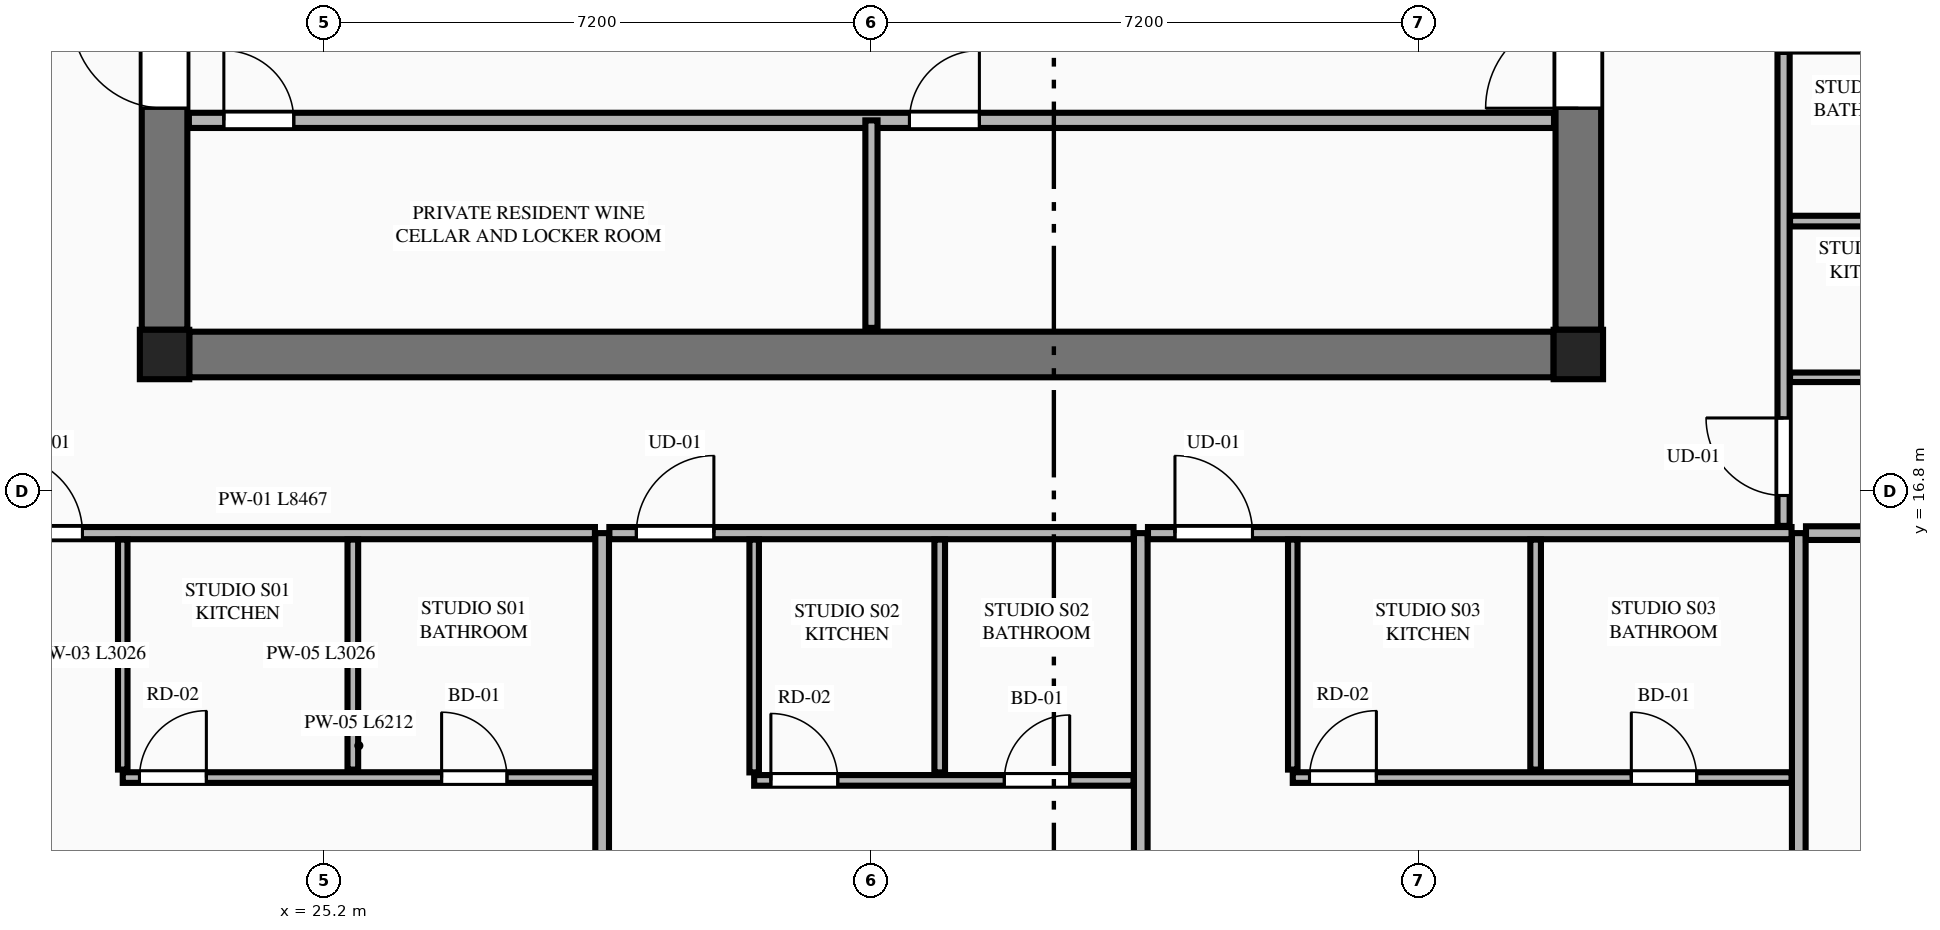
"""IFC4 building model, lengths in metres.
Left out: names, types, materials, properties, quantities, classifications, styles, units other than length and angle.
Written with IfcOpenShell. Run it as: python <this file> out.ifc"""

import sys

from ifc_helpers import new_model, si_unit, direction, frame, frame_2d, origin, origin_2d, place, context, subcontext, project, spatial, rectangle, extrude, element, fill, save


model = new_model("IFC4")
c1 = context("Model", 3, precision=1e-05, world=origin(), true_north=direction((0.0, 1.0)))
c2 = subcontext(c1, "Body", "Model", "MODEL_VIEW")
j1 = project(units=[si_unit("LENGTHUNIT", "METRE"), si_unit("PLANEANGLEUNIT", "RADIAN")], contexts=[c1])
p1 = place(None, origin())
s1 = spatial("IfcSite", under=j1, at=p1, CompositionType="ELEMENT")
p2 = place(p1, origin())
s2 = spatial("IfcBuilding", under=s1, at=p2, CompositionType="ELEMENT")
p3 = place(p2, frame((0.0, 0.0, 203.85)))
s3 = spatial("IfcBuildingStorey", under=s2, at=p3, CompositionType="ELEMENT", Elevation=203.85)
for number, where, z_axis, x_axis in (
    (1, (23.1, 18.6, 0.0), (0.0, 0.0, 1.0), (1.0, 0.0, 0.0)),
    (2, (41.7, 18.6, 0.0), (0.0, 0.0, 1.0), (1.0, 0.0, 0.0)),
):
    element("IfcColumn", number, at=place(p3, frame(where, z_axis=z_axis, x_axis=x_axis)), inside=s3, PredefinedType="COLUMN", context=c2, shape_type="SweptSolid", body=[
        extrude(rectangle(XDim=0.65, YDim=0.65, at=origin_2d()), origin(), (0.0, 0.0, 1.0), 3.55),
    ])
p4 = place(p3, frame((23.425, 18.6, 0.0), z_axis=(0.0, 0.0, 1.0), x_axis=(1.0, 0.0, 0.0)))
e3 = element("IfcWall", 3, at=p4, inside=s3, PredefinedType="SHEAR", context=c2, shape_type="SweptSolid", body=[
    extrude(rectangle(XDim=17.95, YDim=0.6, at=frame_2d((8.975, 0.0))), origin(), (0.0, 0.0, 1.0), 3.35),
])
p5 = place(p3, frame((23.1, 18.925, 0.0), z_axis=(0.0, 0.0, 1.0), x_axis=(0.0, 1.0, 0.0)))
e4 = element("IfcWall", 4, at=p5, inside=s3, PredefinedType="SHEAR", context=c2, shape_type="SweptSolid", body=[
    extrude(rectangle(XDim=13.95, YDim=0.6, at=frame_2d((6.975, 0.0))), origin(), (0.0, 0.0, 1.0), 3.35),
])
p6 = place(p5, frame((2.915, 0.0, 0.0)))
e5 = element("IfcOpeningElement", 5, at=p6, cuts=e4, PredefinedType="OPENING", context=c2, shape_type="SweptSolid", body=[
    extrude(rectangle(XDim=1.22, YDim=2.25, at=frame_2d((0.61, 1.125))), frame((0.0, 0.31, 0.0), z_axis=(0.0, -1.0, 0.0), x_axis=(1.0, 0.0, 0.0)), (0.0, 0.0, 1.0), 0.62),
])
p7 = place(p3, frame((41.7, 18.925, 0.0), z_axis=(0.0, 0.0, 1.0), x_axis=(0.0, 1.0, 0.0)))
e6 = element("IfcWall", 6, at=p7, inside=s3, PredefinedType="SHEAR", context=c2, shape_type="SweptSolid", body=[
    extrude(rectangle(XDim=13.95, YDim=0.6, at=frame_2d((6.975, 0.0))), origin(), (0.0, 0.0, 1.0), 3.35),
])
p8 = place(p7, frame((2.915, 0.0, 0.0)))
e7 = element("IfcOpeningElement", 7, at=p8, cuts=e6, PredefinedType="OPENING", context=c2, shape_type="SweptSolid", body=[
    extrude(rectangle(XDim=1.22, YDim=2.25, at=frame_2d((0.61, 1.125))), frame((0.0, 0.31, 0.0), z_axis=(0.0, -1.0, 0.0), x_axis=(1.0, 0.0, 0.0)), (0.0, 0.0, 1.0), 0.62),
])
p9 = place(p3, frame((23.42, 21.68, 0.0), z_axis=(0.0, 0.0, 1.0), x_axis=(1.0, 0.0, 0.0)))
e8 = element("IfcWall", 8, at=p9, inside=s3, PredefinedType="PLUMBINGWALL", context=c2, shape_type="SweptSolid", body=[
    extrude(rectangle(XDim=17.96, YDim=0.2, at=frame_2d((8.98, 0.0))), origin(), (0.0, 0.0, 1.0), 3.35),
])
p10 = place(p9, frame((0.46, 0.0, 0.0)))
e9 = element("IfcOpeningElement", 9, at=p10, cuts=e8, PredefinedType="OPENING", context=c2, shape_type="SweptSolid", body=[
    extrude(rectangle(XDim=0.92, YDim=2.15, at=frame_2d((0.46, 1.075))), frame((0.0, 0.11, 0.0), z_axis=(0.0, -1.0, 0.0), x_axis=(1.0, 0.0, 0.0)), (0.0, 0.0, 1.0), 0.22),
])
p11 = place(p9, frame((9.48, 0.0, 0.0)))
e10 = element("IfcOpeningElement", 10, at=p11, cuts=e8, PredefinedType="OPENING", context=c2, shape_type="SweptSolid", body=[
    extrude(rectangle(XDim=0.92, YDim=2.15, at=frame_2d((0.46, 1.075))), frame((0.0, 0.11, 0.0), z_axis=(0.0, -1.0, 0.0), x_axis=(1.0, 0.0, 0.0)), (0.0, 0.0, 1.0), 0.22),
])
p12 = place(p3, frame((32.4, 18.95, 0.0), z_axis=(0.0, 0.0, 1.0), x_axis=(0.0, 1.0, 0.0)))
e11 = element("IfcWall", 11, at=p12, inside=s3, PredefinedType="PARTITIONING", context=c2, shape_type="SweptSolid", body=[
    extrude(rectangle(XDim=2.73, YDim=0.16, at=frame_2d((1.365, 0.0))), origin(), (0.0, 0.0, 1.0), 3.35),
])
for number, where, z_axis, x_axis in (
    (12, (28.857, 5.755, 0.0), (0.0, 0.0, 1.0), (0.0, 1.0, 0.0)),
    (13, (35.943, 5.755, 0.0), (0.0, 0.0, 1.0), (0.0, 1.0, 0.0)),
):
    element("IfcWall", number, at=place(p3, frame(where, z_axis=z_axis, x_axis=x_axis)), inside=s3, PredefinedType="PARTITIONING", context=c2, shape_type="SweptSolid", body=[
        extrude(rectangle(XDim=10.495, YDim=0.18, at=frame_2d((5.248, 0.0))), origin(), (0.0, 0.0, 1.0), 2.807),
    ])
p13 = place(p3, frame((44.6, 5.968, 0.0), z_axis=(0.0, 0.0, 1.0), x_axis=(0.0, 1.0, 0.0)))
e14 = element("IfcWall", 14, at=p13, inside=s3, PredefinedType="PARTITIONING", context=c2, shape_type="SweptSolid", body=[
    extrude(rectangle(XDim=10.282, YDim=0.18, at=frame_2d((5.141, 0.0))), origin(), (0.0, 0.0, 1.0), 3.35),
])
p14 = place(p3, frame((20.295, 16.25, 0.0), z_axis=(0.0, 0.0, 1.0), x_axis=(1.0, 0.0, 0.0)))
e15 = element("IfcWall", 15, at=p14, inside=s3, PredefinedType="PARTITIONING", context=c2, shape_type="SweptSolid", body=[
    extrude(rectangle(XDim=8.467, YDim=0.16, at=frame_2d((4.233, 0.0))), origin(), (0.0, 0.0, 1.0), 3.35),
])
p15 = place(p14, frame((0.705, 0.0, 0.0)))
e16 = element("IfcOpeningElement", 16, at=p15, cuts=e15, PredefinedType="OPENING", context=c2, shape_type="SweptSolid", body=[
    extrude(rectangle(XDim=1.02, YDim=2.25, at=frame_2d((0.51, 1.125))), frame((0.0, 0.09, 0.0), z_axis=(0.0, -1.0, 0.0), x_axis=(1.0, 0.0, 0.0)), (0.0, 0.0, 1.0), 0.18),
])
p16 = place(p3, frame((22.55, 13.139, 0.0), z_axis=(0.0, 0.0, 1.0), x_axis=(0.0, 1.0, 0.0)))
e17 = element("IfcWall", 17, at=p16, inside=s3, PredefinedType="PARTITIONING", context=c2, shape_type="SweptSolid", body=[
    extrude(rectangle(XDim=3.026, YDim=0.125, at=frame_2d((1.513, 0.0))), origin(), (0.0, 0.0, 1.0), 2.807),
])
p17 = place(p3, frame((22.55, 13.034, 0.0), z_axis=(0.0, 0.0, 1.0), x_axis=(1.0, 0.0, 0.0)))
e18 = element("IfcWall", 18, at=p17, inside=s3, PredefinedType="PLUMBINGWALL", context=c2, shape_type="SweptSolid", body=[
    extrude(rectangle(XDim=6.212, YDim=0.14, at=frame_2d((3.106, 0.0))), origin(), (0.0, 0.0, 1.0), 3.35),
])
p18 = place(p17, frame((4.195, 0.0, 0.0)))
e19 = element("IfcOpeningElement", 19, at=p18, cuts=e18, PredefinedType="OPENING", context=c2, shape_type="SweptSolid", body=[
    extrude(rectangle(XDim=0.86, YDim=2.1, at=frame_2d((0.43, 1.05))), frame((0.0, 0.08, 0.0), z_axis=(0.0, -1.0, 0.0), x_axis=(1.0, 0.0, 0.0)), (0.0, 0.0, 1.0), 0.16),
])
p19 = place(p17, frame((0.22, 0.0, 0.0)))
e20 = element("IfcOpeningElement", 20, at=p19, cuts=e18, PredefinedType="OPENING", context=c2, shape_type="SweptSolid", body=[
    extrude(rectangle(XDim=0.88, YDim=2.15, at=frame_2d((0.44, 1.075))), frame((0.0, 0.08, 0.0), z_axis=(0.0, -1.0, 0.0), x_axis=(1.0, 0.0, 0.0)), (0.0, 0.0, 1.0), 0.16),
])
p20 = place(p3, frame((25.577, 13.139, 0.0), z_axis=(0.0, 0.0, 1.0), x_axis=(0.0, 1.0, 0.0)))
e21 = element("IfcWall", 21, at=p20, inside=s3, PredefinedType="PLUMBINGWALL", context=c2, shape_type="SweptSolid", body=[
    extrude(rectangle(XDim=3.026, YDim=0.14, at=frame_2d((1.513, 0.0))), origin(), (0.0, 0.0, 1.0), 3.35),
])
p21 = place(p3, frame((28.952, 16.25, 0.0), z_axis=(0.0, 0.0, 1.0), x_axis=(1.0, 0.0, 0.0)))
e22 = element("IfcWall", 22, at=p21, inside=s3, PredefinedType="PARTITIONING", context=c2, shape_type="SweptSolid", body=[
    extrude(rectangle(XDim=6.896, YDim=0.16, at=frame_2d((3.448, 0.0))), origin(), (0.0, 0.0, 1.0), 3.35),
])
p22 = place(p21, frame((0.355, 0.0, 0.0)))
e23 = element("IfcOpeningElement", 23, at=p22, cuts=e22, PredefinedType="OPENING", context=c2, shape_type="SweptSolid", body=[
    extrude(rectangle(XDim=1.02, YDim=2.25, at=frame_2d((0.51, 1.125))), frame((0.0, 0.09, 0.0), z_axis=(0.0, -1.0, 0.0), x_axis=(1.0, 0.0, 0.0)), (0.0, 0.0, 1.0), 0.18),
])
p23 = place(p3, frame((30.857, 13.102, 0.0), z_axis=(0.0, 0.0, 1.0), x_axis=(0.0, 1.0, 0.0)))
e24 = element("IfcWall", 24, at=p23, inside=s3, PredefinedType="PARTITIONING", context=c2, shape_type="SweptSolid", body=[
    extrude(rectangle(XDim=3.063, YDim=0.125, at=frame_2d((1.531, 0.0))), origin(), (0.0, 0.0, 1.0), 3.35),
])
p24 = place(p3, frame((30.857, 12.997, 0.0), z_axis=(0.0, 0.0, 1.0), x_axis=(1.0, 0.0, 0.0)))
e25 = element("IfcWall", 25, at=p24, inside=s3, PredefinedType="PLUMBINGWALL", context=c2, shape_type="SweptSolid", body=[
    extrude(rectangle(XDim=4.991, YDim=0.14, at=frame_2d((2.496, 0.0))), origin(), (0.0, 0.0, 1.0), 3.35),
])
p25 = place(p24, frame((3.291, 0.0, 0.0)))
e26 = element("IfcOpeningElement", 26, at=p25, cuts=e25, PredefinedType="OPENING", context=c2, shape_type="SweptSolid", body=[
    extrude(rectangle(XDim=0.86, YDim=2.1, at=frame_2d((0.43, 1.05))), frame((0.0, 0.08, 0.0), z_axis=(0.0, -1.0, 0.0), x_axis=(1.0, 0.0, 0.0)), (0.0, 0.0, 1.0), 0.16),
])
p26 = place(p24, frame((0.22, 0.0, 0.0)))
e27 = element("IfcOpeningElement", 27, at=p26, cuts=e25, PredefinedType="OPENING", context=c2, shape_type="SweptSolid", body=[
    extrude(rectangle(XDim=0.88, YDim=2.15, at=frame_2d((0.44, 1.075))), frame((0.0, 0.08, 0.0), z_axis=(0.0, -1.0, 0.0), x_axis=(1.0, 0.0, 0.0)), (0.0, 0.0, 1.0), 0.16),
])
p27 = place(p3, frame((33.298, 13.102, 0.0), z_axis=(0.0, 0.0, 1.0), x_axis=(0.0, 1.0, 0.0)))
e28 = element("IfcWall", 28, at=p27, inside=s3, PredefinedType="PLUMBINGWALL", context=c2, shape_type="SweptSolid", body=[
    extrude(rectangle(XDim=3.063, YDim=0.14, at=frame_2d((1.531, 0.0))), origin(), (0.0, 0.0, 1.0), 3.35),
])
p28 = place(p3, frame((36.038, 16.25, 0.0), z_axis=(0.0, 0.0, 1.0), x_axis=(1.0, 0.0, 0.0)))
e29 = element("IfcWall", 29, at=p28, inside=s3, PredefinedType="PARTITIONING", context=c2, shape_type="SweptSolid", body=[
    extrude(rectangle(XDim=8.467, YDim=0.16, at=frame_2d((4.233, 0.0))), origin(), (0.0, 0.0, 1.0), 3.35),
])
p29 = place(p28, frame((0.355, 0.0, 0.0)))
e30 = element("IfcOpeningElement", 30, at=p29, cuts=e29, PredefinedType="OPENING", context=c2, shape_type="SweptSolid", body=[
    extrude(rectangle(XDim=1.02, YDim=2.25, at=frame_2d((0.51, 1.125))), frame((0.0, 0.09, 0.0), z_axis=(0.0, -1.0, 0.0), x_axis=(1.0, 0.0, 0.0)), (0.0, 0.0, 1.0), 0.18),
])
p30 = place(p3, frame((37.943, 13.139, 0.0), z_axis=(0.0, 0.0, 1.0), x_axis=(0.0, 1.0, 0.0)))
e31 = element("IfcWall", 31, at=p30, inside=s3, PredefinedType="PARTITIONING", context=c2, shape_type="SweptSolid", body=[
    extrude(rectangle(XDim=3.026, YDim=0.125, at=frame_2d((1.513, 0.0))), origin(), (0.0, 0.0, 1.0), 3.35),
])
p31 = place(p3, frame((37.943, 13.034, 0.0), z_axis=(0.0, 0.0, 1.0), x_axis=(1.0, 0.0, 0.0)))
e32 = element("IfcWall", 32, at=p31, inside=s3, PredefinedType="PLUMBINGWALL", context=c2, shape_type="SweptSolid", body=[
    extrude(rectangle(XDim=6.562, YDim=0.14, at=frame_2d((3.281, 0.0))), origin(), (0.0, 0.0, 1.0), 3.35),
])
p32 = place(p31, frame((4.454, 0.0, 0.0)))
e33 = element("IfcOpeningElement", 33, at=p32, cuts=e32, PredefinedType="OPENING", context=c2, shape_type="SweptSolid", body=[
    extrude(rectangle(XDim=0.86, YDim=2.1, at=frame_2d((0.43, 1.05))), frame((0.0, 0.08, 0.0), z_axis=(0.0, -1.0, 0.0), x_axis=(1.0, 0.0, 0.0)), (0.0, 0.0, 1.0), 0.16),
])
p33 = place(p31, frame((0.22, 0.0, 0.0)))
e34 = element("IfcOpeningElement", 34, at=p33, cuts=e32, PredefinedType="OPENING", context=c2, shape_type="SweptSolid", body=[
    extrude(rectangle(XDim=0.88, YDim=2.15, at=frame_2d((0.44, 1.075))), frame((0.0, 0.08, 0.0), z_axis=(0.0, -1.0, 0.0), x_axis=(1.0, 0.0, 0.0)), (0.0, 0.0, 1.0), 0.16),
])
p34 = place(p3, frame((41.138, 13.139, 0.0), z_axis=(0.0, 0.0, 1.0), x_axis=(0.0, 1.0, 0.0)))
e35 = element("IfcWall", 35, at=p34, inside=s3, PredefinedType="PLUMBINGWALL", context=c2, shape_type="SweptSolid", body=[
    extrude(rectangle(XDim=3.026, YDim=0.14, at=frame_2d((1.513, 0.0))), origin(), (0.0, 0.0, 1.0), 3.35),
])
p35 = place(p3, frame((44.695, 16.25, 0.0), z_axis=(0.0, 0.0, 1.0), x_axis=(1.0, 0.0, 0.0)))
e36 = element("IfcWall", 36, at=p35, inside=s3, PredefinedType="PARTITIONING", context=c2, shape_type="SweptSolid", body=[
    extrude(rectangle(XDim=5.894, YDim=0.18, at=frame_2d((2.947, 0.0))), origin(), (0.0, 0.0, 1.0), 3.35),
])
p36 = place(p3, frame((44.4, 16.345, 0.0), z_axis=(0.0, 0.0, 1.0), x_axis=(0.0, 1.0, 0.0)))
e37 = element("IfcWall", 37, at=p36, inside=s3, PredefinedType="PARTITIONING", context=c2, shape_type="SweptSolid", body=[
    extrude(rectangle(XDim=6.236, YDim=0.16, at=frame_2d((3.118, 0.0))), origin(), (0.0, 0.0, 1.0), 3.35),
])
p37 = place(p36, frame((0.4, 0.0, 0.0)))
e38 = element("IfcOpeningElement", 38, at=p37, cuts=e37, PredefinedType="OPENING", context=c2, shape_type="SweptSolid", body=[
    extrude(rectangle(XDim=1.02, YDim=2.25, at=frame_2d((0.51, 1.125))), frame((0.0, 0.09, 0.0), z_axis=(0.0, -1.0, 0.0), x_axis=(1.0, 0.0, 0.0)), (0.0, 0.0, 1.0), 0.18),
])
p38 = place(p3, frame((44.485, 18.3, 0.0), z_axis=(0.0, 0.0, 1.0), x_axis=(1.0, 0.0, 0.0)))
e39 = element("IfcWall", 39, at=p38, inside=s3, PredefinedType="PARTITIONING", context=c2, shape_type="SweptSolid", body=[
    extrude(rectangle(XDim=2.43, YDim=0.125, at=frame_2d((1.215, 0.0))), origin(), (0.0, 0.0, 1.0), 2.807),
])
p39 = place(p3, frame((44.485, 20.355, 0.0), z_axis=(0.0, 0.0, 1.0), x_axis=(1.0, 0.0, 0.0)))
e40 = element("IfcWall", 40, at=p39, inside=s3, PredefinedType="PLUMBINGWALL", context=c2, shape_type="SweptSolid", body=[
    extrude(rectangle(XDim=2.43, YDim=0.14, at=frame_2d((1.215, 0.0))), origin(), (0.0, 0.0, 1.0), 3.35),
])
p40 = place(p6, origin())
e41 = element("IfcDoor", 41, at=p40, inside=s3, OperationType="SINGLE_SWING_RIGHT", PredefinedType="DOOR", context=c2, shape_type="SweptSolid", body=[
    extrude(rectangle(XDim=1.22, YDim=2.25, at=frame_2d((0.61, 1.125))), frame((0.0, 0.025, 0.0), z_axis=(0.0, -1.0, 0.0), x_axis=(1.0, 0.0, 0.0)), (0.0, 0.0, 1.0), 0.05),
])
fill(e5, e41)
p41 = place(p8, origin())
e42 = element("IfcDoor", 42, at=p41, inside=s3, OperationType="SINGLE_SWING_LEFT", PredefinedType="DOOR", context=c2, shape_type="SweptSolid", body=[
    extrude(rectangle(XDim=1.22, YDim=2.25, at=frame_2d((0.61, 1.125))), frame((0.0, 0.025, 0.0), z_axis=(0.0, -1.0, 0.0), x_axis=(1.0, 0.0, 0.0)), (0.0, 0.0, 1.0), 0.05),
])
fill(e7, e42)
p42 = place(p10, origin())
e43 = element("IfcDoor", 43, at=p42, inside=s3, OperationType="SINGLE_SWING_LEFT", PredefinedType="DOOR", context=c2, shape_type="SweptSolid", body=[
    extrude(rectangle(XDim=0.92, YDim=2.15, at=frame_2d((0.46, 1.075))), frame((0.0, 0.025, 0.0), z_axis=(0.0, -1.0, 0.0), x_axis=(1.0, 0.0, 0.0)), (0.0, 0.0, 1.0), 0.05),
])
fill(e9, e43)
p43 = place(p11, origin())
e44 = element("IfcDoor", 44, at=p43, inside=s3, OperationType="SINGLE_SWING_RIGHT", PredefinedType="DOOR", context=c2, shape_type="SweptSolid", body=[
    extrude(rectangle(XDim=0.92, YDim=2.15, at=frame_2d((0.46, 1.075))), frame((0.0, 0.025, 0.0), z_axis=(0.0, -1.0, 0.0), x_axis=(1.0, 0.0, 0.0)), (0.0, 0.0, 1.0), 0.05),
])
fill(e10, e44)
p44 = place(p18, origin())
e45 = element("IfcDoor", 45, at=p44, inside=s3, OperationType="SINGLE_SWING_LEFT", PredefinedType="DOOR", context=c2, shape_type="SweptSolid", body=[
    extrude(rectangle(XDim=0.86, YDim=2.1, at=frame_2d((0.43, 1.05))), frame((0.0, 0.025, 0.0), z_axis=(0.0, -1.0, 0.0), x_axis=(1.0, 0.0, 0.0)), (0.0, 0.0, 1.0), 0.05),
])
fill(e19, e45)
p45 = place(p15, origin())
e46 = element("IfcDoor", 46, at=p45, inside=s3, OperationType="SINGLE_SWING_LEFT", PredefinedType="DOOR", context=c2, shape_type="SweptSolid", body=[
    extrude(rectangle(XDim=1.02, YDim=2.25, at=frame_2d((0.51, 1.125))), frame((0.0, 0.025, 0.0), z_axis=(0.0, -1.0, 0.0), x_axis=(1.0, 0.0, 0.0)), (0.0, 0.0, 1.0), 0.05),
])
fill(e16, e46)
p46 = place(p19, origin())
e47 = element("IfcDoor", 47, at=p46, inside=s3, OperationType="SINGLE_SWING_RIGHT", PredefinedType="DOOR", context=c2, shape_type="SweptSolid", body=[
    extrude(rectangle(XDim=0.88, YDim=2.15, at=frame_2d((0.44, 1.075))), frame((0.0, 0.025, 0.0), z_axis=(0.0, -1.0, 0.0), x_axis=(1.0, 0.0, 0.0)), (0.0, 0.0, 1.0), 0.05),
])
fill(e20, e47)
p47 = place(p25, origin())
e48 = element("IfcDoor", 48, at=p47, inside=s3, OperationType="SINGLE_SWING_RIGHT", PredefinedType="DOOR", context=c2, shape_type="SweptSolid", body=[
    extrude(rectangle(XDim=0.86, YDim=2.1, at=frame_2d((0.43, 1.05))), frame((0.0, 0.025, 0.0), z_axis=(0.0, -1.0, 0.0), x_axis=(1.0, 0.0, 0.0)), (0.0, 0.0, 1.0), 0.05),
])
fill(e26, e48)
p48 = place(p22, origin())
e49 = element("IfcDoor", 49, at=p48, inside=s3, OperationType="SINGLE_SWING_RIGHT", PredefinedType="DOOR", context=c2, shape_type="SweptSolid", body=[
    extrude(rectangle(XDim=1.02, YDim=2.25, at=frame_2d((0.51, 1.125))), frame((0.0, 0.025, 0.0), z_axis=(0.0, -1.0, 0.0), x_axis=(1.0, 0.0, 0.0)), (0.0, 0.0, 1.0), 0.05),
])
fill(e23, e49)
p49 = place(p26, origin())
e50 = element("IfcDoor", 50, at=p49, inside=s3, OperationType="SINGLE_SWING_LEFT", PredefinedType="DOOR", context=c2, shape_type="SweptSolid", body=[
    extrude(rectangle(XDim=0.88, YDim=2.15, at=frame_2d((0.44, 1.075))), frame((0.0, 0.025, 0.0), z_axis=(0.0, -1.0, 0.0), x_axis=(1.0, 0.0, 0.0)), (0.0, 0.0, 1.0), 0.05),
])
fill(e27, e50)
p50 = place(p32, origin())
e51 = element("IfcDoor", 51, at=p50, inside=s3, OperationType="SINGLE_SWING_LEFT", PredefinedType="DOOR", context=c2, shape_type="SweptSolid", body=[
    extrude(rectangle(XDim=0.86, YDim=2.1, at=frame_2d((0.43, 1.05))), frame((0.0, 0.025, 0.0), z_axis=(0.0, -1.0, 0.0), x_axis=(1.0, 0.0, 0.0)), (0.0, 0.0, 1.0), 0.05),
])
fill(e33, e51)
p51 = place(p29, origin())
e52 = element("IfcDoor", 52, at=p51, inside=s3, OperationType="SINGLE_SWING_LEFT", PredefinedType="DOOR", context=c2, shape_type="SweptSolid", body=[
    extrude(rectangle(XDim=1.02, YDim=2.25, at=frame_2d((0.51, 1.125))), frame((0.0, 0.025, 0.0), z_axis=(0.0, -1.0, 0.0), x_axis=(1.0, 0.0, 0.0)), (0.0, 0.0, 1.0), 0.05),
])
fill(e30, e52)
p52 = place(p33, origin())
e53 = element("IfcDoor", 53, at=p52, inside=s3, OperationType="SINGLE_SWING_RIGHT", PredefinedType="DOOR", context=c2, shape_type="SweptSolid", body=[
    extrude(rectangle(XDim=0.88, YDim=2.15, at=frame_2d((0.44, 1.075))), frame((0.0, 0.025, 0.0), z_axis=(0.0, -1.0, 0.0), x_axis=(1.0, 0.0, 0.0)), (0.0, 0.0, 1.0), 0.05),
])
fill(e34, e53)
p53 = place(p37, origin())
e54 = element("IfcDoor", 54, at=p53, inside=s3, OperationType="SINGLE_SWING_RIGHT", PredefinedType="DOOR", context=c2, shape_type="SweptSolid", body=[
    extrude(rectangle(XDim=1.02, YDim=2.25, at=frame_2d((0.51, 1.125))), frame((0.0, 0.025, 0.0), z_axis=(0.0, -1.0, 0.0), x_axis=(1.0, 0.0, 0.0)), (0.0, 0.0, 1.0), 0.05),
])
fill(e38, e54)
save(model, sys.argv[1])
